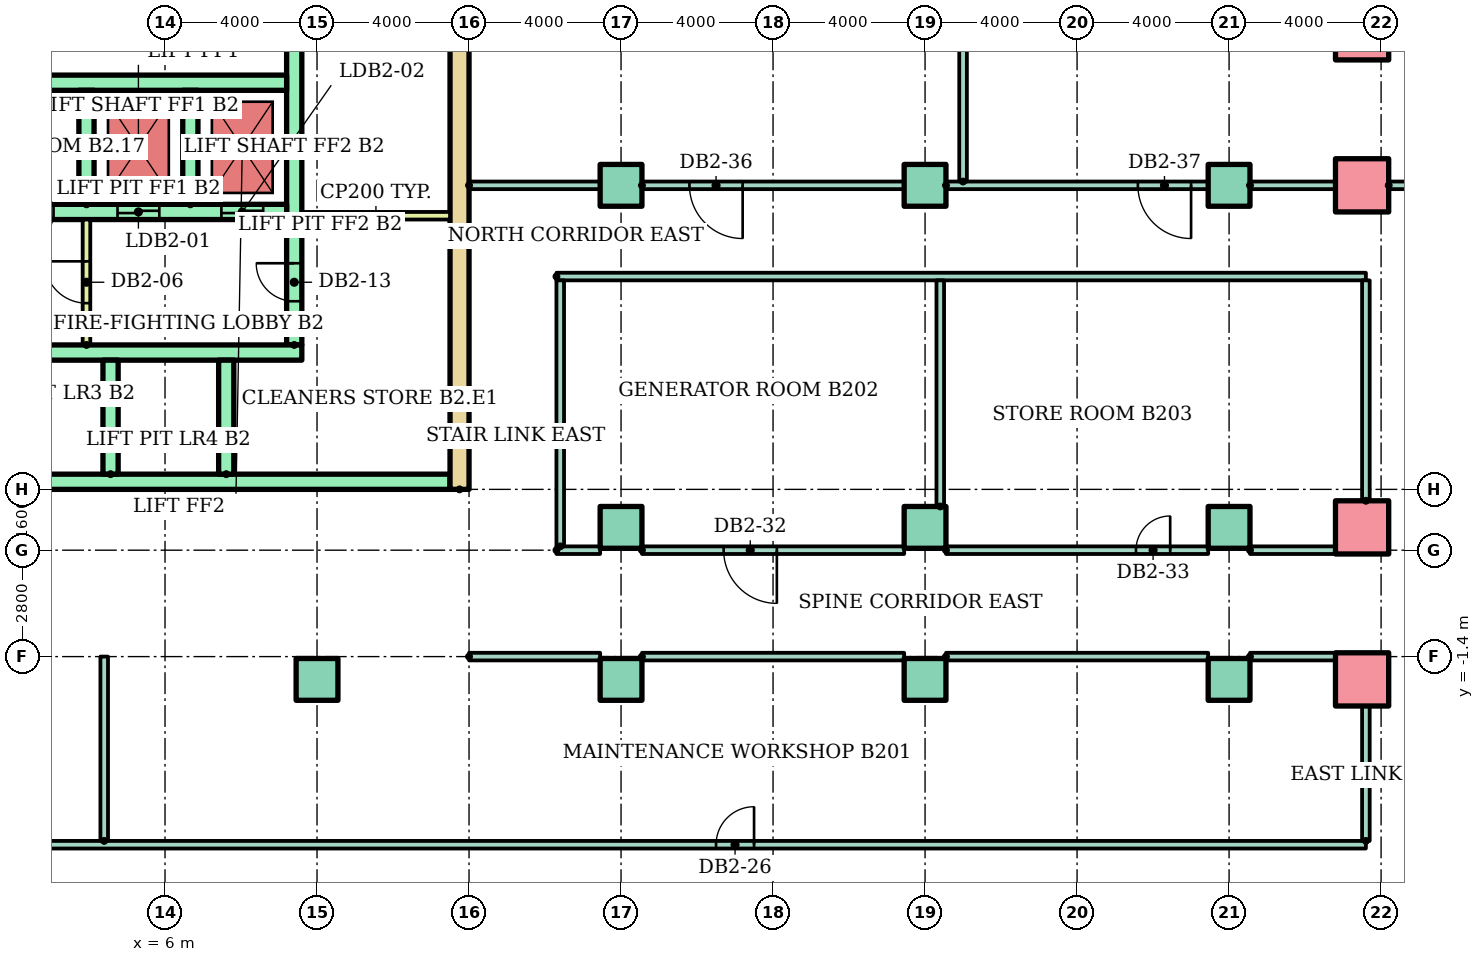
"""IFC4 building model, lengths in metres.
Left out: names, types, materials, properties, quantities, classifications, styles, units other than length and angle.
Written with IfcOpenShell. Run it as: python <this file> out.ifc"""

import sys

from ifc_helpers import new_model, si_unit, direction, frame, frame_2d, origin, origin_2d, place, context, subcontext, project, spatial, rectangle, hollow_rectangle, extrude, element, fill, save


model = new_model("IFC4")
c1 = context("Model", 3, precision=1e-05, world=origin(), true_north=direction((0.0, 1.0)))
c2 = subcontext(c1, "Body", "Model", "MODEL_VIEW")
j1 = project(units=[si_unit("LENGTHUNIT", "METRE"), si_unit("PLANEANGLEUNIT", "RADIAN")], contexts=[c1])
p1 = place(None, origin())
s1 = spatial("IfcSite", under=j1, at=p1, CompositionType="ELEMENT")
p2 = place(p1, origin())
s2 = spatial("IfcBuilding", under=s1, at=p2, CompositionType="ELEMENT")
p3 = place(p2, frame((0.0, 0.0, -10.0)))
s3 = spatial("IfcBuildingStorey", under=s2, at=p3, CompositionType="ELEMENT", Elevation=-10.0)
for number, where in (
    (1, (10.0, -2.0, -0.3)),
    (2, (18.0, -2.0, -0.3)),
    (3, (26.0, -2.0, -0.3)),
    (4, (34.0, -2.0, -0.3)),
):
    element("IfcColumn", number, at=place(p3, frame(where)), inside=s3, PredefinedType="COLUMN", context=c2, shape_type="SweptSolid", body=[
        extrude(rectangle(XDim=1.1, YDim=1.1, at=origin_2d()), origin(), (0.0, 0.0, 1.0), 5.3),
    ])
p4 = place(p3, frame((37.5, -2.0, -0.3)))
e5 = element("IfcColumn", 5, at=p4, inside=s3, PredefinedType="COLUMN", context=c2, shape_type="SweptSolid", body=[
    extrude(hollow_rectangle(XDim=1.4, YDim=1.4, WallThickness=0.08, at=origin_2d()), origin(), (0.0, 0.0, 1.0), 5.3),
])
for number, where in (
    (6, (18.0, 2.0, -0.3)),
    (7, (26.0, 2.0, -0.3)),
    (8, (34.0, 2.0, -0.3)),
):
    element("IfcColumn", number, at=place(p3, frame(where)), inside=s3, PredefinedType="COLUMN", context=c2, shape_type="SweptSolid", body=[
        extrude(rectangle(XDim=1.1, YDim=1.1, at=origin_2d()), origin(), (0.0, 0.0, 1.0), 5.3),
    ])
p5 = place(p3, frame((37.5, 2.0, -0.3)))
e9 = element("IfcColumn", 9, at=p5, inside=s3, PredefinedType="COLUMN", context=c2, shape_type="SweptSolid", body=[
    extrude(hollow_rectangle(XDim=1.4, YDim=1.4, WallThickness=0.08, at=origin_2d()), origin(), (0.0, 0.0, 1.0), 5.3),
])
for number, where in (
    (10, (18.0, 11.0, -0.3)),
    (11, (26.0, 11.0, -0.3)),
    (12, (34.0, 11.0, -0.3)),
):
    element("IfcColumn", number, at=place(p3, frame(where)), inside=s3, PredefinedType="COLUMN", context=c2, shape_type="SweptSolid", body=[
        extrude(rectangle(XDim=1.1, YDim=1.1, at=origin_2d()), origin(), (0.0, 0.0, 1.0), 5.3),
    ])
for number, where in (
    (13, (37.5, 11.0, -0.3)),
    (14, (37.5, 15.0, -0.3)),
):
    element("IfcColumn", number, at=place(p3, frame(where)), inside=s3, PredefinedType="COLUMN", context=c2, shape_type="SweptSolid", body=[
        extrude(hollow_rectangle(XDim=1.4, YDim=1.4, WallThickness=0.08, at=origin_2d()), origin(), (0.0, 0.0, 1.0), 5.3),
    ])
p6 = place(p3, frame((13.75, 3.0, 0.0), z_axis=(0.0, 0.0, 1.0), x_axis=(0.0, 1.0, 0.0)))
e15 = element("IfcWall", 15, at=p6, inside=s3, PredefinedType="SHEAR", context=c2, shape_type="SweptSolid", body=[
    extrude(rectangle(XDim=17.4, YDim=0.5, at=frame_2d((8.7, 0.0))), origin(), (0.0, 0.0, 1.0), 4.65),
])
p7 = place(p3, frame((9.4, 6.8, 0.0), z_axis=(0.0, 0.0, 1.0), x_axis=(0.0, 1.0, 0.0)))
e16 = element("IfcWall", 16, at=p7, inside=s3, PredefinedType="SHEAR", context=c2, shape_type="SweptSolid", body=[
    extrude(rectangle(XDim=12.7, YDim=0.4, at=frame_2d((6.35, 0.0))), origin(), (0.0, 0.0, 1.0), 4.65),
])
p8 = place(p7, frame((1.15, 0.0, 0.0)))
e17 = element("IfcOpeningElement", 17, at=p8, cuts=e16, PredefinedType="OPENING", context=c2, shape_type="SweptSolid", body=[
    extrude(rectangle(XDim=1.0, YDim=2.1, at=frame_2d((0.5, 1.05))), frame((0.0, 0.21, 0.0), z_axis=(0.0, -1.0, 0.0), x_axis=(1.0, 0.0, 0.0)), (0.0, 0.0, 1.0), 0.42),
])
p9 = place(p7, frame((7.925, 0.0, 0.0)))
e18 = element("IfcOpeningElement", 18, at=p9, cuts=e16, PredefinedType="OPENING", context=c2, shape_type="SweptSolid", body=[
    extrude(rectangle(XDim=1.0, YDim=2.1, at=frame_2d((0.5, 1.05))), frame((0.0, 0.21, 0.0), z_axis=(0.0, -1.0, 0.0), x_axis=(1.0, 0.0, 0.0)), (0.0, 0.0, 1.0), 0.42),
])
p10 = place(p3, frame((-13.5, 3.2, 0.0)))
e19 = element("IfcWall", 19, at=p10, inside=s3, PredefinedType="SHEAR", context=c2, shape_type="SweptSolid", body=[
    extrude(rectangle(XDim=27.0, YDim=0.4, at=frame_2d((13.5, 0.0))), origin(), (0.0, 0.0, 1.0), 4.65),
])
p11 = place(p10, frame((12.6, 0.0, 0.0)))
e20 = element("IfcOpeningElement", 20, at=p11, cuts=e19, PredefinedType="OPENING", context=c2, shape_type="SweptSolid", body=[
    extrude(rectangle(XDim=1.8, YDim=2.1, at=frame_2d((0.9, 1.05))), frame((0.0, 0.21, 0.0), z_axis=(0.0, -1.0, 0.0), x_axis=(1.0, 0.0, 0.0)), (0.0, 0.0, 1.0), 0.42),
])
p12 = place(p3, frame((1.522, 6.6, 0.0)))
e21 = element("IfcWall", 21, at=p12, inside=s3, PredefinedType="SHEAR", context=c2, shape_type="SweptSolid", body=[
    extrude(rectangle(XDim=8.078, YDim=0.4, at=frame_2d((4.039, 0.0))), origin(), (0.0, 0.0, 1.0), 4.65),
])
for number, where, z_axis, x_axis in (
    (22, (4.567, 3.4, 0.0), (0.0, 0.0, 1.0), (0.0, 1.0, 0.0)),
    (23, (7.611, 3.4, 0.0), (0.0, 0.0, 1.0), (0.0, 1.0, 0.0)),
):
    element("IfcWall", number, at=place(p3, frame(where, z_axis=z_axis, x_axis=x_axis)), inside=s3, PredefinedType="SHEAR", context=c2, shape_type="SweptSolid", body=[
        extrude(rectangle(XDim=3.0, YDim=0.4, at=frame_2d((1.5, 0.0))), origin(), (0.0, 0.0, 1.0), 4.65),
    ])
p13 = place(p3, frame((1.2, 10.3, 0.0)))
e24 = element("IfcWall", 24, at=p13, inside=s3, PredefinedType="SHEAR", context=c2, shape_type="SweptSolid", body=[
    extrude(rectangle(XDim=8.0, YDim=0.4, at=frame_2d((4.0, 0.0))), origin(), (0.0, 0.0, 1.0), 4.65),
])
p14 = place(p13, frame((3.55, 0.0, 0.0)))
e25 = element("IfcOpeningElement", 25, at=p14, cuts=e24, PredefinedType="OPENING", context=c2, shape_type="SweptSolid", body=[
    extrude(rectangle(XDim=1.1, YDim=2.1, at=frame_2d((0.55, 1.05))), frame((0.0, 0.21, 0.0), z_axis=(0.0, -1.0, 0.0), x_axis=(1.0, 0.0, 0.0)), (0.0, 0.0, 1.0), 0.42),
])
p15 = place(p13, frame((6.283, 0.0, 0.0)))
e26 = element("IfcOpeningElement", 26, at=p15, cuts=e24, PredefinedType="OPENING", context=c2, shape_type="SweptSolid", body=[
    extrude(rectangle(XDim=1.1, YDim=2.1, at=frame_2d((0.55, 1.05))), frame((0.0, 0.21, 0.0), z_axis=(0.0, -1.0, 0.0), x_axis=(1.0, 0.0, 0.0)), (0.0, 0.0, 1.0), 0.42),
])
p16 = place(p13, frame((0.867, 0.0, 0.0)))
e27 = element("IfcOpeningElement", 27, at=p16, cuts=e24, PredefinedType="OPENING", context=c2, shape_type="SweptSolid", body=[
    extrude(rectangle(XDim=1.0, YDim=2.1, at=frame_2d((0.5, 1.05))), frame((0.0, 0.21, 0.0), z_axis=(0.0, -1.0, 0.0), x_axis=(1.0, 0.0, 0.0)), (0.0, 0.0, 1.0), 0.42),
])
p17 = place(p3, frame((1.2, 13.7, 0.0)))
e28 = element("IfcWall", 28, at=p17, inside=s3, PredefinedType="SHEAR", context=c2, shape_type="SweptSolid", body=[
    extrude(rectangle(XDim=8.0, YDim=0.4, at=frame_2d((4.0, 0.0))), origin(), (0.0, 0.0, 1.0), 4.65),
])
for number, where, z_axis, x_axis in (
    (29, (3.933, 10.5, 0.0), (0.0, 0.0, 1.0), (0.0, 1.0, 0.0)),
    (30, (6.667, 10.5, 0.0), (0.0, 0.0, 1.0), (0.0, 1.0, 0.0)),
):
    element("IfcWall", number, at=place(p3, frame(where, z_axis=z_axis, x_axis=x_axis)), inside=s3, PredefinedType="SHEAR", context=c2, shape_type="SweptSolid", body=[
        extrude(rectangle(XDim=3.0, YDim=0.4, at=frame_2d((1.5, 0.0))), origin(), (0.0, 0.0, 1.0), 4.65),
    ])
p18 = place(p3, frame((3.933, 6.8, 0.0), z_axis=(0.0, 0.0, 1.0), x_axis=(0.0, 1.0, 0.0)))
e31 = element("IfcWall", 31, at=p18, inside=s3, PredefinedType="PARTITIONING", context=c2, shape_type="SweptSolid", body=[
    extrude(rectangle(XDim=3.3, YDim=0.2, at=frame_2d((1.65, 0.0))), origin(), (0.0, 0.0, 1.0), 4.65),
])
p19 = place(p18, frame((1.1, 0.0, 0.0)))
e32 = element("IfcOpeningElement", 32, at=p19, cuts=e31, PredefinedType="OPENING", context=c2, shape_type="SweptSolid", body=[
    extrude(rectangle(XDim=1.1, YDim=2.1, at=frame_2d((0.55, 1.05))), frame((0.0, 0.11, 0.0), z_axis=(0.0, -1.0, 0.0), x_axis=(1.0, 0.0, 0.0)), (0.0, 0.0, 1.0), 0.22),
])
p20 = place(p3, frame((9.6, 10.2, 0.0)))
e33 = element("IfcWall", 33, at=p20, inside=s3, PredefinedType="PARTITIONING", context=c2, shape_type="SweptSolid", body=[
    extrude(rectangle(XDim=3.9, YDim=0.2, at=frame_2d((1.95, 0.0))), origin(), (0.0, 0.0, 1.0), 4.65),
])
p21 = place(p3, frame((-37.6, -6.35, 0.0)))
e34 = element("IfcWall", 34, at=p21, inside=s3, PredefinedType="PARTITIONING", context=c2, shape_type="SweptSolid", body=[
    extrude(rectangle(XDim=75.2, YDim=0.2, at=frame_2d((37.6, 0.0))), origin(), (0.0, 0.0, 1.0), 4.65),
])
p22 = place(p21, frame((6.5, 0.0, 0.0)))
e35 = element("IfcOpeningElement", 35, at=p22, cuts=e34, PredefinedType="OPENING", context=c2, shape_type="SweptSolid", body=[
    extrude(rectangle(XDim=1.0, YDim=2.1, at=frame_2d((0.5, 1.05))), frame((0.0, 0.11, 0.0), z_axis=(0.0, -1.0, 0.0), x_axis=(1.0, 0.0, 0.0)), (0.0, 0.0, 1.0), 0.22),
])
p23 = place(p21, frame((20.5, 0.0, 0.0)))
e36 = element("IfcOpeningElement", 36, at=p23, cuts=e34, PredefinedType="OPENING", context=c2, shape_type="SweptSolid", body=[
    extrude(rectangle(XDim=1.0, YDim=2.1, at=frame_2d((0.5, 1.05))), frame((0.0, 0.11, 0.0), z_axis=(0.0, -1.0, 0.0), x_axis=(1.0, 0.0, 0.0)), (0.0, 0.0, 1.0), 0.22),
])
p24 = place(p21, frame((34.55, 0.0, 0.0)))
e37 = element("IfcOpeningElement", 37, at=p24, cuts=e34, PredefinedType="OPENING", context=c2, shape_type="SweptSolid", body=[
    extrude(rectangle(XDim=0.9, YDim=2.1, at=frame_2d((0.45, 1.05))), frame((0.0, 0.11, 0.0), z_axis=(0.0, -1.0, 0.0), x_axis=(1.0, 0.0, 0.0)), (0.0, 0.0, 1.0), 0.22),
])
p25 = place(p21, frame((58.1, 0.0, 0.0)))
e38 = element("IfcOpeningElement", 38, at=p25, cuts=e34, PredefinedType="OPENING", context=c2, shape_type="SweptSolid", body=[
    extrude(rectangle(XDim=1.0, YDim=2.1, at=frame_2d((0.5, 1.05))), frame((0.0, 0.11, 0.0), z_axis=(0.0, -1.0, 0.0), x_axis=(1.0, 0.0, 0.0)), (0.0, 0.0, 1.0), 0.22),
])
p26 = place(p3, frame((14.0, -1.4, 0.0)))
e39 = element("IfcWall", 39, at=p26, inside=s3, PredefinedType="PARTITIONING", context=c2, shape_type="SweptSolid", body=[
    extrude(rectangle(XDim=3.45, YDim=0.2, at=frame_2d((1.725, 0.0))), origin(), (0.0, 0.0, 1.0), 4.65),
])
for number, where in (
    (40, (18.55, -1.4, 0.0)),
    (41, (26.55, -1.4, 0.0)),
):
    element("IfcWall", number, at=place(p3, frame(where)), inside=s3, PredefinedType="PARTITIONING", context=c2, shape_type="SweptSolid", body=[
        extrude(rectangle(XDim=6.9, YDim=0.2, at=frame_2d((3.45, 0.0))), origin(), (0.0, 0.0, 1.0), 4.65),
    ])
p27 = place(p3, frame((34.55, -1.4, 0.0)))
e42 = element("IfcWall", 42, at=p27, inside=s3, PredefinedType="PARTITIONING", context=c2, shape_type="SweptSolid", body=[
    extrude(rectangle(XDim=2.25, YDim=0.2, at=frame_2d((1.125, 0.0))), origin(), (0.0, 0.0, 1.0), 4.65),
])
p28 = place(p3, frame((16.3, 1.4, 0.0)))
e43 = element("IfcWall", 43, at=p28, inside=s3, PredefinedType="PARTITIONING", context=c2, shape_type="SweptSolid", body=[
    extrude(rectangle(XDim=1.15, YDim=0.2, at=frame_2d((0.575, 0.0))), origin(), (0.0, 0.0, 1.0), 4.65),
])
p29 = place(p3, frame((18.55, 1.4, 0.0)))
e44 = element("IfcWall", 44, at=p29, inside=s3, PredefinedType="PARTITIONING", context=c2, shape_type="SweptSolid", body=[
    extrude(rectangle(XDim=6.9, YDim=0.2, at=frame_2d((3.45, 0.0))), origin(), (0.0, 0.0, 1.0), 4.65),
])
p30 = place(p29, frame((2.15, 0.0, 0.0)))
e45 = element("IfcOpeningElement", 45, at=p30, cuts=e44, PredefinedType="OPENING", context=c2, shape_type="SweptSolid", body=[
    extrude(rectangle(XDim=1.4, YDim=2.1, at=frame_2d((0.7, 1.05))), frame((0.0, 0.11, 0.0), z_axis=(0.0, -1.0, 0.0), x_axis=(1.0, 0.0, 0.0)), (0.0, 0.0, 1.0), 0.22),
])
p31 = place(p3, frame((26.55, 1.4, 0.0)))
e46 = element("IfcWall", 46, at=p31, inside=s3, PredefinedType="PARTITIONING", context=c2, shape_type="SweptSolid", body=[
    extrude(rectangle(XDim=6.9, YDim=0.2, at=frame_2d((3.45, 0.0))), origin(), (0.0, 0.0, 1.0), 4.65),
])
p32 = place(p31, frame((5.0, 0.0, 0.0)))
e47 = element("IfcOpeningElement", 47, at=p32, cuts=e46, PredefinedType="OPENING", context=c2, shape_type="SweptSolid", body=[
    extrude(rectangle(XDim=0.9, YDim=2.1, at=frame_2d((0.45, 1.05))), frame((0.0, 0.11, 0.0), z_axis=(0.0, -1.0, 0.0), x_axis=(1.0, 0.0, 0.0)), (0.0, 0.0, 1.0), 0.22),
])
p33 = place(p3, frame((34.55, 1.4, 0.0)))
e48 = element("IfcWall", 48, at=p33, inside=s3, PredefinedType="PARTITIONING", context=c2, shape_type="SweptSolid", body=[
    extrude(rectangle(XDim=2.25, YDim=0.2, at=frame_2d((1.125, 0.0))), origin(), (0.0, 0.0, 1.0), 4.65),
])
p34 = place(p3, frame((16.3, 8.6, 0.0)))
e49 = element("IfcWall", 49, at=p34, inside=s3, PredefinedType="PARTITIONING", context=c2, shape_type="SweptSolid", body=[
    extrude(rectangle(XDim=21.3, YDim=0.2, at=frame_2d((10.65, 0.0))), origin(), (0.0, 0.0, 1.0), 4.65),
])
p35 = place(p3, frame((14.0, 11.0, 0.0)))
e50 = element("IfcWall", 50, at=p35, inside=s3, PredefinedType="PARTITIONING", context=c2, shape_type="SweptSolid", body=[
    extrude(rectangle(XDim=3.45, YDim=0.2, at=frame_2d((1.725, 0.0))), origin(), (0.0, 0.0, 1.0), 4.65),
])
p36 = place(p3, frame((18.55, 11.0, 0.0)))
e51 = element("IfcWall", 51, at=p36, inside=s3, PredefinedType="PARTITIONING", context=c2, shape_type="SweptSolid", body=[
    extrude(rectangle(XDim=6.9, YDim=0.2, at=frame_2d((3.45, 0.0))), origin(), (0.0, 0.0, 1.0), 4.65),
])
p37 = place(p36, frame((1.25, 0.0, 0.0)))
e52 = element("IfcOpeningElement", 52, at=p37, cuts=e51, PredefinedType="OPENING", context=c2, shape_type="SweptSolid", body=[
    extrude(rectangle(XDim=1.4, YDim=2.1, at=frame_2d((0.7, 1.05))), frame((0.0, 0.11, 0.0), z_axis=(0.0, -1.0, 0.0), x_axis=(1.0, 0.0, 0.0)), (0.0, 0.0, 1.0), 0.22),
])
p38 = place(p3, frame((26.55, 11.0, 0.0)))
e53 = element("IfcWall", 53, at=p38, inside=s3, PredefinedType="PARTITIONING", context=c2, shape_type="SweptSolid", body=[
    extrude(rectangle(XDim=6.9, YDim=0.2, at=frame_2d((3.45, 0.0))), origin(), (0.0, 0.0, 1.0), 4.65),
])
p39 = place(p38, frame((5.05, 0.0, 0.0)))
e54 = element("IfcOpeningElement", 54, at=p39, cuts=e53, PredefinedType="OPENING", context=c2, shape_type="SweptSolid", body=[
    extrude(rectangle(XDim=1.4, YDim=2.1, at=frame_2d((0.7, 1.05))), frame((0.0, 0.11, 0.0), z_axis=(0.0, -1.0, 0.0), x_axis=(1.0, 0.0, 0.0)), (0.0, 0.0, 1.0), 0.22),
])
p40 = place(p3, frame((34.55, 11.0, 0.0)))
e55 = element("IfcWall", 55, at=p40, inside=s3, PredefinedType="PARTITIONING", context=c2, shape_type="SweptSolid", body=[
    extrude(rectangle(XDim=2.25, YDim=0.2, at=frame_2d((1.125, 0.0))), origin(), (0.0, 0.0, 1.0), 4.65),
])
p41 = place(p3, frame((38.2, 11.0, 0.0)))
e56 = element("IfcWall", 56, at=p41, inside=s3, PredefinedType="PARTITIONING", context=c2, shape_type="SweptSolid", body=[
    extrude(rectangle(XDim=1.4, YDim=0.2, at=frame_2d((0.7, 0.0))), origin(), (0.0, 0.0, 1.0), 4.65),
])
p42 = place(p3, frame((4.4, -6.25, 0.0), z_axis=(0.0, 0.0, 1.0), x_axis=(0.0, 1.0, 0.0)))
e57 = element("IfcWall", 57, at=p42, inside=s3, PredefinedType="PARTITIONING", context=c2, shape_type="SweptSolid", body=[
    extrude(rectangle(XDim=4.85, YDim=0.2, at=frame_2d((2.425, 0.0))), origin(), (0.0, 0.0, 1.0), 4.65),
])
p43 = place(p3, frame((16.4, 1.5, 0.0), z_axis=(0.0, 0.0, 1.0), x_axis=(0.0, 1.0, 0.0)))
e58 = element("IfcWall", 58, at=p43, inside=s3, PredefinedType="PARTITIONING", context=c2, shape_type="SweptSolid", body=[
    extrude(rectangle(XDim=7.0, YDim=0.2, at=frame_2d((3.5, 0.0))), origin(), (0.0, 0.0, 1.0), 4.65),
])
p44 = place(p3, frame((26.4, 2.55, 0.0), z_axis=(0.0, 0.0, 1.0), x_axis=(0.0, 1.0, 0.0)))
e59 = element("IfcWall", 59, at=p44, inside=s3, PredefinedType="PARTITIONING", context=c2, shape_type="SweptSolid", body=[
    extrude(rectangle(XDim=5.95, YDim=0.2, at=frame_2d((2.975, 0.0))), origin(), (0.0, 0.0, 1.0), 4.65),
])
p45 = place(p3, frame((27.0, 11.1, 0.0), z_axis=(0.0, 0.0, 1.0), x_axis=(0.0, 1.0, 0.0)))
e60 = element("IfcWall", 60, at=p45, inside=s3, PredefinedType="PARTITIONING", context=c2, shape_type="SweptSolid", body=[
    extrude(rectangle(XDim=8.5, YDim=0.2, at=frame_2d((4.25, 0.0))), origin(), (0.0, 0.0, 1.0), 4.65),
])
p46 = place(p3, frame((37.6, -6.25, 0.0), z_axis=(0.0, 0.0, 1.0), x_axis=(0.0, 1.0, 0.0)))
e61 = element("IfcWall", 61, at=p46, inside=s3, PredefinedType="PARTITIONING", context=c2, shape_type="SweptSolid", body=[
    extrude(rectangle(XDim=3.55, YDim=0.2, at=frame_2d((1.775, 0.0))), origin(), (0.0, 0.0, 1.0), 4.65),
])
p47 = place(p3, frame((37.6, 2.7, 0.0), z_axis=(0.0, 0.0, 1.0), x_axis=(0.0, 1.0, 0.0)))
e62 = element("IfcWall", 62, at=p47, inside=s3, PredefinedType="PARTITIONING", context=c2, shape_type="SweptSolid", body=[
    extrude(rectangle(XDim=5.8, YDim=0.2, at=frame_2d((2.9, 0.0))), origin(), (0.0, 0.0, 1.0), 4.65),
])
p48 = place(p14, origin())
e63 = element("IfcDoor", 63, at=p48, inside=s3, OperationType="SLIDING_TO_LEFT", PredefinedType="DOOR", context=c2, shape_type="SweptSolid", body=[
    extrude(rectangle(XDim=1.1, YDim=2.1, at=frame_2d((0.55, 1.05))), frame((0.0, 0.025, 0.0), z_axis=(0.0, -1.0, 0.0), x_axis=(1.0, 0.0, 0.0)), (0.0, 0.0, 1.0), 0.05),
])
fill(e25, e63)
p49 = place(p15, origin())
e64 = element("IfcDoor", 64, at=p49, inside=s3, OperationType="SLIDING_TO_LEFT", PredefinedType="DOOR", context=c2, shape_type="SweptSolid", body=[
    extrude(rectangle(XDim=1.1, YDim=2.1, at=frame_2d((0.55, 1.05))), frame((0.0, 0.025, 0.0), z_axis=(0.0, -1.0, 0.0), x_axis=(1.0, 0.0, 0.0)), (0.0, 0.0, 1.0), 0.05),
])
fill(e26, e64)
p50 = place(p16, frame((1.0, 0.0, 0.0), z_axis=(0.0, 0.0, 1.0), x_axis=(-1.0, 0.0, 0.0)))
e65 = element("IfcDoor", 65, at=p50, inside=s3, OperationType="SINGLE_SWING_LEFT", PredefinedType="DOOR", context=c2, shape_type="SweptSolid", body=[
    extrude(rectangle(XDim=1.0, YDim=2.1, at=frame_2d((0.5, 1.05))), frame((0.0, 0.025, 0.0), z_axis=(0.0, -1.0, 0.0), x_axis=(1.0, 0.0, 0.0)), (0.0, 0.0, 1.0), 0.05),
])
fill(e27, e65)
p51 = place(p19, origin())
e66 = element("IfcDoor", 66, at=p51, inside=s3, OperationType="SINGLE_SWING_RIGHT", PredefinedType="DOOR", context=c2, shape_type="SweptSolid", body=[
    extrude(rectangle(XDim=1.1, YDim=2.1, at=frame_2d((0.55, 1.05))), frame((0.0, 0.025, 0.0), z_axis=(0.0, -1.0, 0.0), x_axis=(1.0, 0.0, 0.0)), (0.0, 0.0, 1.0), 0.05),
])
fill(e32, e66)
p52 = place(p8, origin())
e67 = element("IfcDoor", 67, at=p52, inside=s3, OperationType="SINGLE_SWING_RIGHT", PredefinedType="DOOR", context=c2, shape_type="SweptSolid", body=[
    extrude(rectangle(XDim=1.0, YDim=2.1, at=frame_2d((0.5, 1.05))), frame((0.0, 0.025, 0.0), z_axis=(0.0, -1.0, 0.0), x_axis=(1.0, 0.0, 0.0)), (0.0, 0.0, 1.0), 0.05),
])
fill(e17, e67)
p53 = place(p25, origin())
e68 = element("IfcDoor", 68, at=p53, inside=s3, OperationType="SINGLE_SWING_RIGHT", PredefinedType="DOOR", context=c2, shape_type="SweptSolid", body=[
    extrude(rectangle(XDim=1.0, YDim=2.1, at=frame_2d((0.5, 1.05))), frame((0.0, 0.025, 0.0), z_axis=(0.0, -1.0, 0.0), x_axis=(1.0, 0.0, 0.0)), (0.0, 0.0, 1.0), 0.05),
])
fill(e38, e68)
p54 = place(p30, frame((1.4, 0.0, 0.0), z_axis=(0.0, 0.0, 1.0), x_axis=(-1.0, 0.0, 0.0)))
e69 = element("IfcDoor", 69, at=p54, inside=s3, OperationType="DOUBLE_DOOR_SINGLE_SWING", PredefinedType="DOOR", context=c2, shape_type="SweptSolid", body=[
    extrude(rectangle(XDim=1.4, YDim=2.1, at=frame_2d((0.7, 1.05))), frame((0.0, 0.025, 0.0), z_axis=(0.0, -1.0, 0.0), x_axis=(1.0, 0.0, 0.0)), (0.0, 0.0, 1.0), 0.05),
])
fill(e45, e69)
p55 = place(p32, origin())
e70 = element("IfcDoor", 70, at=p55, inside=s3, OperationType="SINGLE_SWING_RIGHT", PredefinedType="DOOR", context=c2, shape_type="SweptSolid", body=[
    extrude(rectangle(XDim=0.9, YDim=2.1, at=frame_2d((0.45, 1.05))), frame((0.0, 0.025, 0.0), z_axis=(0.0, -1.0, 0.0), x_axis=(1.0, 0.0, 0.0)), (0.0, 0.0, 1.0), 0.05),
])
fill(e47, e70)
p56 = place(p37, frame((1.4, 0.0, 0.0), z_axis=(0.0, 0.0, 1.0), x_axis=(-1.0, 0.0, 0.0)))
e71 = element("IfcDoor", 71, at=p56, inside=s3, OperationType="DOUBLE_DOOR_SINGLE_SWING", PredefinedType="DOOR", context=c2, shape_type="SweptSolid", body=[
    extrude(rectangle(XDim=1.4, YDim=2.1, at=frame_2d((0.7, 1.05))), frame((0.0, 0.025, 0.0), z_axis=(0.0, -1.0, 0.0), x_axis=(1.0, 0.0, 0.0)), (0.0, 0.0, 1.0), 0.05),
])
fill(e52, e71)
p57 = place(p39, frame((1.4, 0.0, 0.0), z_axis=(0.0, 0.0, 1.0), x_axis=(-1.0, 0.0, 0.0)))
e72 = element("IfcDoor", 72, at=p57, inside=s3, OperationType="DOUBLE_DOOR_SINGLE_SWING", PredefinedType="DOOR", context=c2, shape_type="SweptSolid", body=[
    extrude(rectangle(XDim=1.4, YDim=2.1, at=frame_2d((0.7, 1.05))), frame((0.0, 0.025, 0.0), z_axis=(0.0, -1.0, 0.0), x_axis=(1.0, 0.0, 0.0)), (0.0, 0.0, 1.0), 0.05),
])
fill(e54, e72)
save(model, sys.argv[1])
